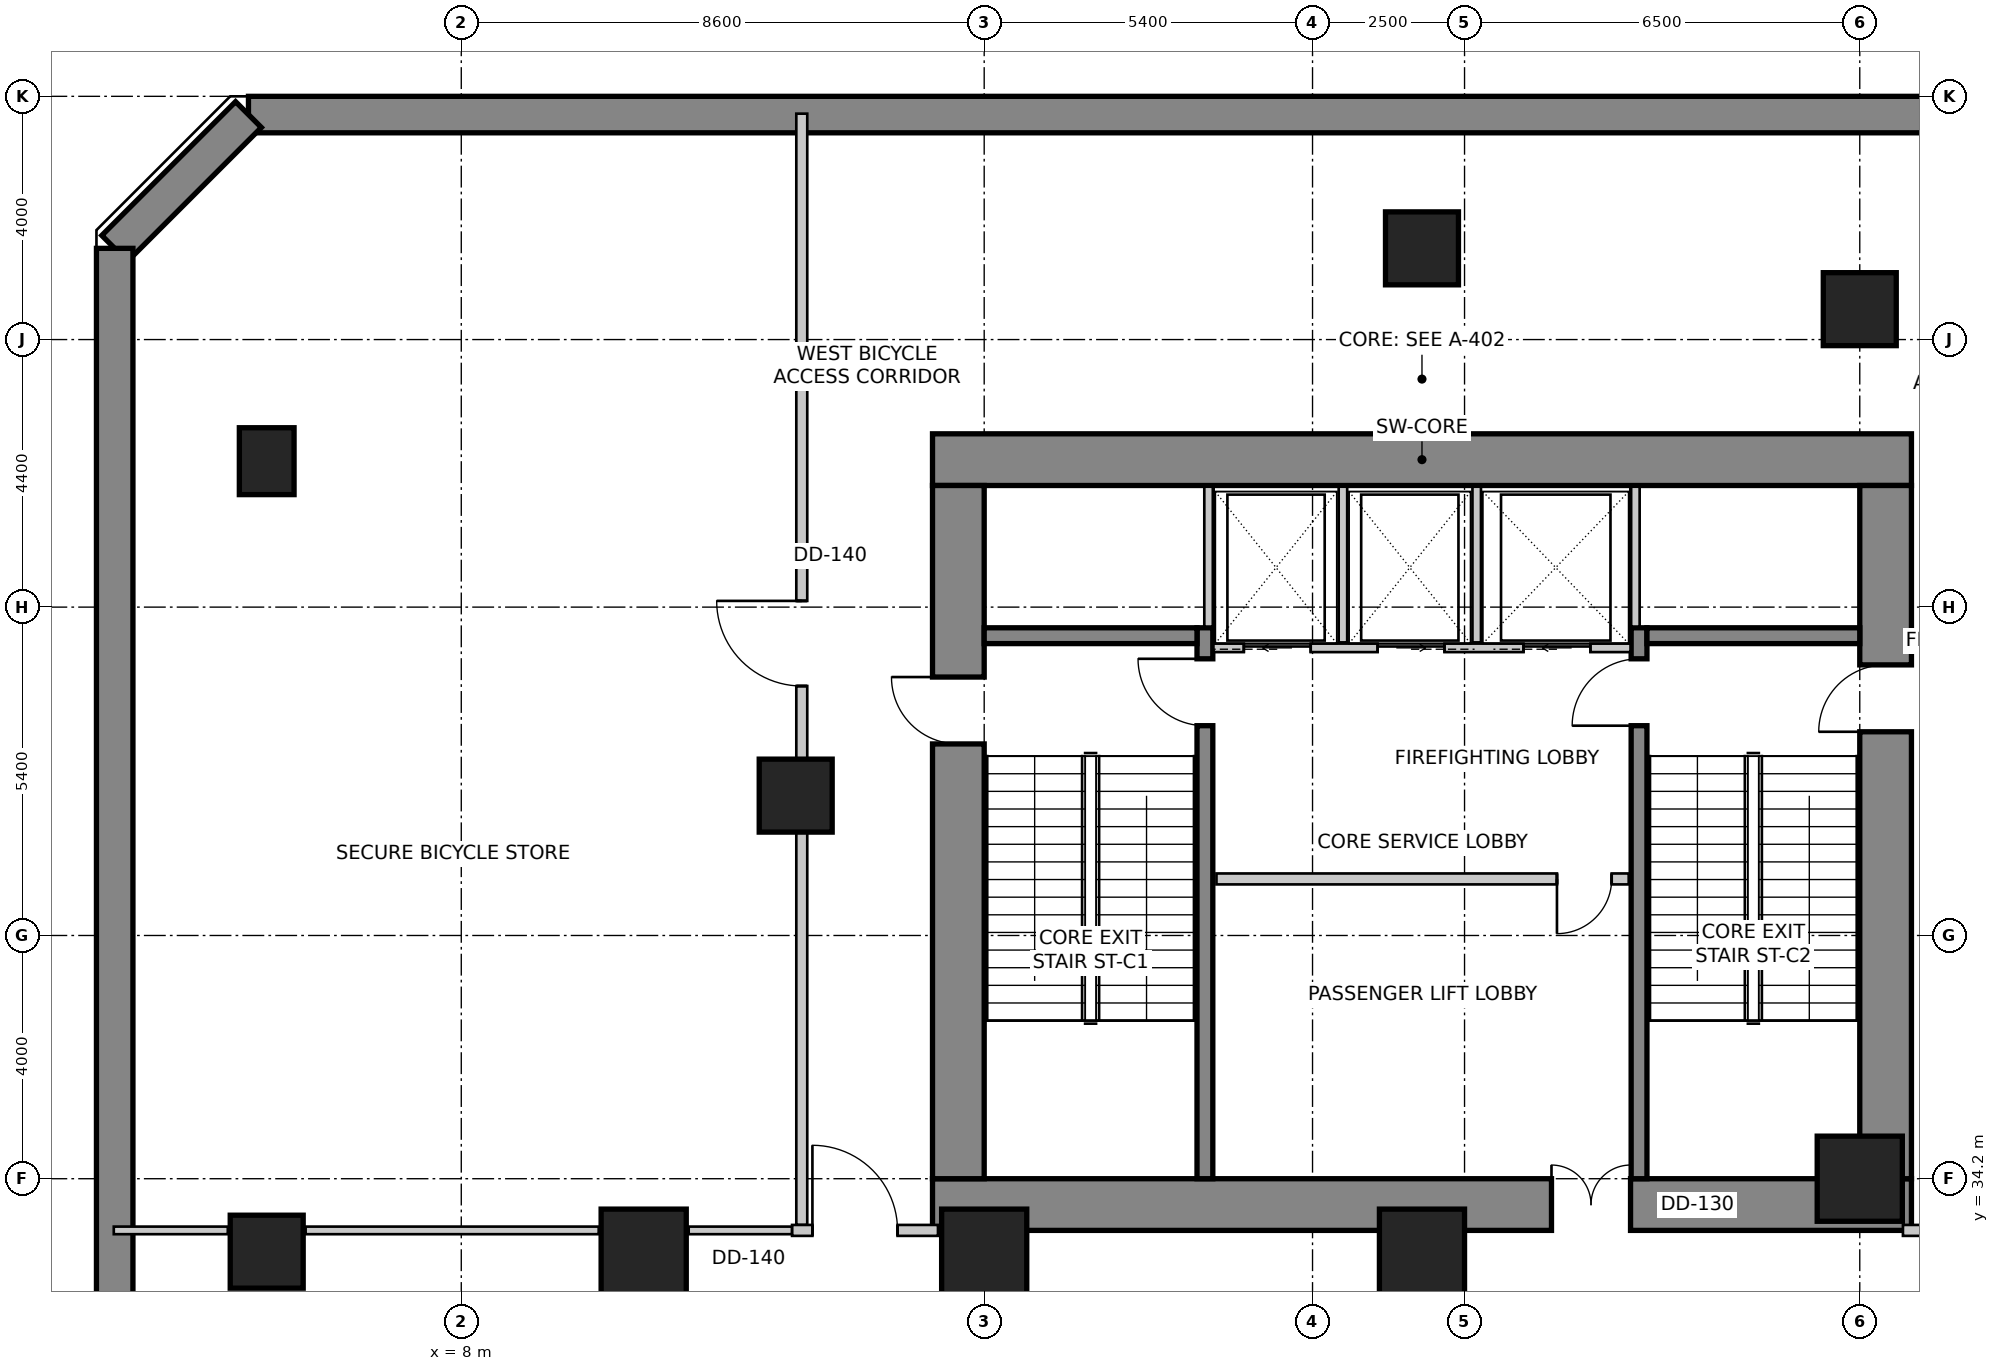
"""IFC4 building model, lengths in metres.
Left out: names, types, materials, properties, quantities, classifications, styles, units other than length and angle.
Written with IfcOpenShell. Run it as: python <this file> out.ifc"""

import sys

from ifc_helpers import new_model, si_unit, direction, frame, frame_2d, origin, origin_2d, place, context, subcontext, project, spatial, rectangle, extrude, source, transform, mapped, element, fill, save


model = new_model("IFC4")
c1 = context("Model", 3, precision=1e-05, world=origin(), true_north=direction((0.0, 1.0)))
c2 = subcontext(c1, "Body", "Model", "MODEL_VIEW")
j1 = project(units=[si_unit("LENGTHUNIT", "METRE"), si_unit("PLANEANGLEUNIT", "RADIAN")], contexts=[c1])
p1 = place(None, origin())
s1 = spatial("IfcSite", under=j1, at=p1, CompositionType="ELEMENT")
p2 = place(p1, origin())
s2 = spatial("IfcBuilding", under=s1, at=p2, CompositionType="ELEMENT")
p3 = place(p2, frame((0.0, 0.0, -5.4)))
s3 = spatial("IfcBuildingStorey", under=s2, at=p3, CompositionType="ELEMENT", Elevation=-5.4)
p4 = place(p3, frame((15.75, 46.025, 0.0), z_axis=(0.0, 0.0, 1.0), x_axis=(1.0, 0.0, 0.0)))
e1 = element("IfcWall", 1, at=p4, inside=s3, PredefinedType="SHEAR", context=c2, shape_type="SweptSolid", body=[
    extrude(rectangle(XDim=16.1, YDim=0.85, at=frame_2d((8.05, 0.0))), origin(), (0.0, 0.0, 1.0), 5.4),
])
p5 = place(p3, frame((15.75, 33.775, 0.0), z_axis=(0.0, 0.0, 1.0), x_axis=(1.0, 0.0, 0.0)))
e2 = element("IfcWall", 2, at=p5, inside=s3, PredefinedType="SHEAR", context=c2, shape_type="SweptSolid", body=[
    extrude(rectangle(XDim=16.1, YDim=0.85, at=frame_2d((8.05, 0.0))), origin(), (0.0, 0.0, 1.0), 5.4),
])
m1 = source(origin(), c2, "Body", "SweptSolid", [
    extrude(rectangle(XDim=1.3, YDim=2.15, at=frame_2d((0.65, 1.075))), frame((0.0, 0.435, 0.0), z_axis=(0.0, -1.0, 0.0), x_axis=(1.0, 0.0, 0.0)), (0.0, 0.0, 1.0), 0.87),
])
p6 = place(p5, frame((10.18, 0.0, 0.0)))
e3 = element("IfcOpeningElement", 3, at=p6, cuts=e2, PredefinedType="OPENING", context=c2, shape_type="MappedRepresentation", body=[
    mapped(m1, transform((0.0, 0.0, 0.0), scale=1.0)),
])
p7 = place(p3, frame((16.175, 34.2, 0.0), z_axis=(0.0, 0.0, 1.0), x_axis=(0.0, 1.0, 0.0)))
e4 = element("IfcWall", 4, at=p7, inside=s3, PredefinedType="SHEAR", context=c2, shape_type="SweptSolid", body=[
    extrude(rectangle(XDim=11.4, YDim=0.85, at=frame_2d((5.7, 0.0))), origin(), (0.0, 0.0, 1.0), 5.4),
])
m2 = source(origin(), c2, "Body", "SweptSolid", [
    extrude(rectangle(XDim=1.1, YDim=2.15, at=frame_2d((0.55, 1.075))), frame((0.0, 0.435, 0.0), z_axis=(0.0, -1.0, 0.0), x_axis=(1.0, 0.0, 0.0)), (0.0, 0.0, 1.0), 0.87),
])
p8 = place(p7, frame((7.15, 0.0, 0.0)))
e5 = element("IfcOpeningElement", 5, at=p8, cuts=e4, PredefinedType="OPENING", context=c2, shape_type="MappedRepresentation", body=[
    mapped(m2, transform((0.0, 0.0, 0.0), scale=1.0)),
])
p9 = place(p3, frame((31.425, 34.2, 0.0), z_axis=(0.0, 0.0, 1.0), x_axis=(0.0, 1.0, 0.0)))
e6 = element("IfcWall", 6, at=p9, inside=s3, PredefinedType="SHEAR", context=c2, shape_type="SweptSolid", body=[
    extrude(rectangle(XDim=11.4, YDim=0.85, at=frame_2d((5.7, 0.0))), origin(), (0.0, 0.0, 1.0), 5.4),
])
p10 = place(p9, frame((7.35, 0.0, 0.0)))
e7 = element("IfcOpeningElement", 7, at=p10, cuts=e6, PredefinedType="OPENING", context=c2, shape_type="MappedRepresentation", body=[
    mapped(m2, transform((0.0, 0.0, 0.0), scale=1.0)),
])
p11 = place(p3, frame((20.23, 34.2, 0.0), z_axis=(0.0, 0.0, 1.0), x_axis=(0.0, 1.0, 0.0)))
e8 = element("IfcWall", 8, at=p11, inside=s3, PredefinedType="SHEAR", context=c2, shape_type="SweptSolid", body=[
    extrude(rectangle(XDim=9.06, YDim=0.26, at=frame_2d((4.53, 0.0))), origin(), (0.0, 0.0, 1.0), 5.4),
])
m3 = source(origin(), c2, "Body", "SweptSolid", [
    extrude(rectangle(XDim=1.1, YDim=2.15, at=frame_2d((0.55, 1.075))), frame((0.0, 0.14, 0.0), z_axis=(0.0, -1.0, 0.0), x_axis=(1.0, 0.0, 0.0)), (0.0, 0.0, 1.0), 0.28),
])
p12 = place(p11, frame((7.45, 0.0, 0.0)))
e9 = element("IfcOpeningElement", 9, at=p12, cuts=e8, PredefinedType="OPENING", context=c2, shape_type="MappedRepresentation", body=[
    mapped(m3, transform((0.0, 0.0, 0.0), scale=1.0)),
])
p13 = place(p3, frame((27.37, 34.2, 0.0), z_axis=(0.0, 0.0, 1.0), x_axis=(0.0, 1.0, 0.0)))
e10 = element("IfcWall", 10, at=p13, inside=s3, PredefinedType="SHEAR", context=c2, shape_type="SweptSolid", body=[
    extrude(rectangle(XDim=9.06, YDim=0.26, at=frame_2d((4.53, 0.0))), origin(), (0.0, 0.0, 1.0), 5.4),
])
p14 = place(p13, frame((7.45, 0.0, 0.0)))
e11 = element("IfcOpeningElement", 11, at=p14, cuts=e10, PredefinedType="OPENING", context=c2, shape_type="MappedRepresentation", body=[
    mapped(m3, transform((0.0, 0.0, 0.0), scale=1.0)),
])
for number, where, z_axis, x_axis in (
    (12, (16.6, 43.13, 0.0), (0.0, 0.0, 1.0), (1.0, 0.0, 0.0)),
    (13, (27.5, 43.13, 0.0), (0.0, 0.0, 1.0), (1.0, 0.0, 0.0)),
):
    element("IfcWall", number, at=place(p3, frame(where, z_axis=z_axis, x_axis=x_axis)), inside=s3, PredefinedType="SHEAR", context=c2, shape_type="SweptSolid", body=[
        extrude(rectangle(XDim=3.5, YDim=0.26, at=frame_2d((1.75, 0.0))), origin(), (0.0, 0.0, 1.0), 5.4),
    ])
p15 = place(p3, frame((65.5, 51.7, 0.0), z_axis=(0.0, 0.0, 1.0), x_axis=(-1.0, 0.0, 0.0)))
e14 = element("IfcWall", 14, at=p15, inside=s3, PredefinedType="SHEAR", context=c2, shape_type="SweptSolid", body=[
    extrude(rectangle(XDim=61.0, YDim=0.6, at=frame_2d((30.5, 0.0))), origin(), (0.0, 0.0, 1.0), 5.4),
])
p16 = place(p3, frame((4.5, 51.7, 0.0), z_axis=(0.0, 0.0, 1.0), x_axis=(-0.707106781187, -0.707106781187, 0.0)))
e15 = element("IfcWall", 15, at=p16, inside=s3, PredefinedType="SHEAR", context=c2, shape_type="SweptSolid", body=[
    extrude(rectangle(XDim=3.111, YDim=0.6, at=frame_2d((1.556, 0.0))), origin(), (0.0, 0.0, 1.0), 5.4),
])
p17 = place(p3, frame((2.3, 49.5, 0.0), z_axis=(0.0, 0.0, 1.0), x_axis=(0.0, -1.0, 0.0)))
e16 = element("IfcWall", 16, at=p17, inside=s3, PredefinedType="SHEAR", context=c2, shape_type="SweptSolid", body=[
    extrude(rectangle(XDim=45.0, YDim=0.6, at=frame_2d((22.5, 0.0))), origin(), (0.0, 0.0, 1.0), 5.4),
])
m4 = source(origin(), c2, "Body", "SweptSolid", [
    extrude(rectangle(XDim=1.2, YDim=1.2, at=origin_2d()), origin(), (0.0, 0.0, 1.0), 5.4),
])
p18 = place(p3, frame((4.8, 33.0, 0.0), z_axis=(0.0, 0.0, 1.0), x_axis=(1.0, 0.0, 0.0)))
e17 = element("IfcColumn", 17, at=p18, inside=s3, PredefinedType="COLUMN", context=c2, shape_type="MappedRepresentation", body=[
    mapped(m4, transform((0.0, 0.0, 0.0), scale=1.0)),
])
m5 = source(origin(), c2, "Body", "SweptSolid", [
    extrude(rectangle(XDim=1.4, YDim=1.4, at=origin_2d()), origin(), (0.0, 0.0, 1.0), 5.4),
])
for number, where, z_axis, x_axis in (
    (18, (11.0, 33.0, 0.0), (0.0, 0.0, 1.0), (1.0, 0.0, 0.0)),
    (19, (16.6, 33.0, 0.0), (0.0, 0.0, 1.0), (1.0, 0.0, 0.0)),
    (20, (23.8, 33.0, 0.0), (0.0, 0.0, 1.0), (1.0, 0.0, 0.0)),
    (21, (31.0, 34.2, 0.0), (0.0, 0.0, 1.0), (1.0, 0.0, 0.0)),
):
    element("IfcColumn", number, at=place(p3, frame(where, z_axis=z_axis, x_axis=x_axis)), inside=s3, PredefinedType="COLUMN", context=c2, shape_type="MappedRepresentation", body=[
        mapped(m5, transform((0.0, 0.0, 0.0), scale=1.0)),
    ])
m6 = source(origin(), c2, "Body", "SweptSolid", [
    extrude(rectangle(XDim=0.9, YDim=1.1, at=origin_2d()), origin(), (0.0, 0.0, 1.0), 5.4),
])
p19 = place(p3, frame((4.8, 46.0, 0.0), z_axis=(0.0, 0.0, 1.0), x_axis=(1.0, 0.0, 0.0)))
e22 = element("IfcColumn", 22, at=p19, inside=s3, PredefinedType="COLUMN", context=c2, shape_type="MappedRepresentation", body=[
    mapped(m6, transform((0.0, 0.0, 0.0), scale=1.0)),
])
for number, where, z_axis, x_axis in (
    (23, (13.5, 40.5, 0.0), (0.0, 0.0, 1.0), (1.0, 0.0, 0.0)),
    (24, (23.8, 49.5, 0.0), (0.0, 0.0, 1.0), (1.0, 0.0, 0.0)),
    (25, (31.0, 48.5, 0.0), (0.0, 0.0, 1.0), (1.0, 0.0, 0.0)),
):
    element("IfcColumn", number, at=place(p3, frame(where, z_axis=z_axis, x_axis=x_axis)), inside=s3, PredefinedType="COLUMN", context=c2, shape_type="MappedRepresentation", body=[
        mapped(m4, transform((0.0, 0.0, 0.0), scale=1.0)),
    ])
p20 = place(p3, frame((20.37, 42.93, 0.0), z_axis=(0.0, 0.0, 1.0), x_axis=(1.0, 0.0, 0.0)))
e26 = element("IfcWall", 26, at=p20, inside=s3, PredefinedType="SOLIDWALL", context=c2, shape_type="SweptSolid", body=[
    extrude(rectangle(XDim=6.86, YDim=0.14, at=frame_2d((3.43, 0.0))), origin(), (0.0, 0.0, 1.0), 5.1),
])
m7 = source(origin(), c2, "Body", "SweptSolid", [
    extrude(rectangle(XDim=1.1, YDim=2.15, at=frame_2d((0.55, 1.075))), frame((0.0, 0.08, 0.0), z_axis=(0.0, -1.0, 0.0), x_axis=(1.0, 0.0, 0.0)), (0.0, 0.0, 1.0), 0.16),
])
p21 = place(p20, frame((0.5, 0.0, 0.0)))
e27 = element("IfcOpeningElement", 27, at=p21, cuts=e26, PredefinedType="OPENING", context=c2, shape_type="MappedRepresentation", body=[
    mapped(m7, transform((0.0, 0.0, 0.0), scale=1.0)),
])
p22 = place(p20, frame((2.7, 0.0, 0.0)))
e28 = element("IfcOpeningElement", 28, at=p22, cuts=e26, PredefinedType="OPENING", context=c2, shape_type="MappedRepresentation", body=[
    mapped(m7, transform((0.0, 0.0, 0.0), scale=1.0)),
])
p23 = place(p20, frame((5.1, 0.0, 0.0)))
e29 = element("IfcOpeningElement", 29, at=p23, cuts=e26, PredefinedType="OPENING", context=c2, shape_type="MappedRepresentation", body=[
    mapped(m7, transform((0.0, 0.0, 0.0), scale=1.0)),
])
for number, where, z_axis, x_axis in (
    (30, (20.29, 43.28, 0.0), (0.0, 0.0, 1.0), (0.0, 1.0, 0.0)),
    (31, (27.31, 43.28, 0.0), (0.0, 0.0, 1.0), (0.0, 1.0, 0.0)),
):
    element("IfcWall", number, at=place(p3, frame(where, z_axis=z_axis, x_axis=x_axis)), inside=s3, PredefinedType="SOLIDWALL", context=c2, shape_type="SweptSolid", body=[
        extrude(rectangle(XDim=2.3, YDim=0.14, at=frame_2d((1.15, 0.0))), origin(), (0.0, 0.0, 1.0), 5.1),
    ])
for number, where, z_axis, x_axis in (
    (32, (22.5, 43.02, 0.0), (0.0, 0.0, 1.0), (0.0, 1.0, 0.0)),
    (33, (24.7, 43.02, 0.0), (0.0, 0.0, 1.0), (0.0, 1.0, 0.0)),
):
    element("IfcWall", number, at=place(p3, frame(where, z_axis=z_axis, x_axis=x_axis)), inside=s3, PredefinedType="SOLIDWALL", context=c2, shape_type="SweptSolid", body=[
        extrude(rectangle(XDim=2.56, YDim=0.14, at=frame_2d((1.28, 0.0))), origin(), (0.0, 0.0, 1.0), 5.1),
    ])
p24 = place(p3, frame((27.2, 39.13, 0.0), z_axis=(0.0, 0.0, 1.0), x_axis=(-1.0, 0.0, 0.0)))
e34 = element("IfcWall", 34, at=p24, inside=s3, PredefinedType="PARTITIONING", context=c2, shape_type="SweptSolid", body=[
    extrude(rectangle(XDim=6.78, YDim=0.18, at=frame_2d((3.39, 0.0))), origin(), (0.0, 0.0, 1.0), 5.1),
])
m8 = source(origin(), c2, "Body", "SweptSolid", [
    extrude(rectangle(XDim=0.9, YDim=2.15, at=frame_2d((0.45, 1.075))), frame((0.0, 0.1, 0.0), z_axis=(0.0, -1.0, 0.0), x_axis=(1.0, 0.0, 0.0)), (0.0, 0.0, 1.0), 0.2),
])
p25 = place(p24, frame((0.28, 0.0, 0.0)))
e35 = element("IfcOpeningElement", 35, at=p25, cuts=e34, PredefinedType="OPENING", context=c2, shape_type="MappedRepresentation", body=[
    mapped(m8, transform((0.0, 0.0, 0.0), scale=1.0)),
])
p26 = place(p3, frame((13.44, 33.35, 0.0), z_axis=(0.0, 0.0, 1.0), x_axis=(1.0, 0.0, 0.0)))
e36 = element("IfcWall", 36, at=p26, inside=s3, PredefinedType="PARTITIONING", context=c2, shape_type="SweptSolid", body=[
    extrude(rectangle(XDim=2.4, YDim=0.18, at=frame_2d((1.2, 0.0))), origin(), (0.0, 0.0, 1.0), 3.892),
])
m9 = source(origin(), c2, "Body", "SweptSolid", [
    extrude(rectangle(XDim=1.4, YDim=2.15, at=frame_2d((0.7, 1.075))), frame((0.0, 0.1, 0.0), z_axis=(0.0, -1.0, 0.0), x_axis=(1.0, 0.0, 0.0)), (0.0, 0.0, 1.0), 0.2),
])
p27 = place(p26, frame((0.335, 0.0, 0.0)))
e37 = element("IfcOpeningElement", 37, at=p27, cuts=e36, PredefinedType="OPENING", context=c2, shape_type="MappedRepresentation", body=[
    mapped(m9, transform((0.0, 0.0, 0.0), scale=1.0)),
])
p28 = place(p3, frame((5.44, 33.35, 0.0), z_axis=(0.0, 0.0, 1.0), x_axis=(1.0, 0.0, 0.0)))
e38 = element("IfcWall", 38, at=p28, inside=s3, PredefinedType="PARTITIONING", context=c2, shape_type="SweptSolid", body=[
    extrude(rectangle(XDim=4.82, YDim=0.125, at=frame_2d((2.41, 0.0))), origin(), (0.0, 0.0, 1.0), 3.892),
])
p29 = place(p3, frame((11.74, 33.35, 0.0), z_axis=(0.0, 0.0, 1.0), x_axis=(1.0, 0.0, 0.0)))
e39 = element("IfcWall", 39, at=p29, inside=s3, PredefinedType="PARTITIONING", context=c2, shape_type="SweptSolid", body=[
    extrude(rectangle(XDim=1.698, YDim=0.125, at=frame_2d((0.849, 0.0))), origin(), (0.0, 0.0, 1.0), 3.892),
])
p30 = place(p3, frame((2.285, 33.35, 0.0), z_axis=(0.0, 0.0, 1.0), x_axis=(1.0, 0.0, 0.0)))
e40 = element("IfcWall", 40, at=p30, inside=s3, PredefinedType="PARTITIONING", context=c2, shape_type="SweptSolid", body=[
    extrude(rectangle(XDim=1.875, YDim=0.125, at=frame_2d((0.938, 0.0))), origin(), (0.0, 0.0, 1.0), 5.1),
])
p31 = place(p3, frame((31.71, 33.35, 0.0), z_axis=(0.0, 0.0, 1.0), x_axis=(1.0, 0.0, 0.0)))
e41 = element("IfcWall", 41, at=p31, inside=s3, PredefinedType="PARTITIONING", context=c2, shape_type="SweptSolid", body=[
    extrude(rectangle(XDim=3.45, YDim=0.18, at=frame_2d((1.725, 0.0))), origin(), (0.0, 0.0, 1.0), 5.1),
])
m10 = source(origin(), c2, "Body", "SweptSolid", [
    extrude(rectangle(XDim=1.1, YDim=2.15, at=frame_2d((0.55, 1.075))), frame((0.0, 0.1, 0.0), z_axis=(0.0, -1.0, 0.0), x_axis=(1.0, 0.0, 0.0)), (0.0, 0.0, 1.0), 0.2),
])
p32 = place(p31, frame((1.175, 0.0, 0.0)))
e42 = element("IfcOpeningElement", 42, at=p32, cuts=e41, PredefinedType="OPENING", context=c2, shape_type="MappedRepresentation", body=[
    mapped(m10, transform((0.0, 0.0, 0.0), scale=1.0)),
])
p33 = place(p3, frame((13.6, 33.444, 0.0), z_axis=(0.0, 0.0, 1.0), x_axis=(0.0, 1.0, 0.0)))
e43 = element("IfcWall", 43, at=p33, inside=s3, PredefinedType="PARTITIONING", context=c2, shape_type="SweptSolid", body=[
    extrude(rectangle(XDim=18.271, YDim=0.18, at=frame_2d((9.135, 0.0))), origin(), (0.0, 0.0, 1.0), 4.142),
])
p34 = place(p33, frame((8.858, 0.0, 0.0)))
e44 = element("IfcOpeningElement", 44, at=p34, cuts=e43, PredefinedType="OPENING", context=c2, shape_type="MappedRepresentation", body=[
    mapped(m9, transform((0.0, 0.0, 0.0), scale=1.0)),
])
m11 = source(origin(), c2, "Body", "SweptSolid", [
    extrude(rectangle(XDim=1.1, YDim=2.15, at=frame_2d((0.55, 1.075))), frame((0.0, 0.025, 0.0), z_axis=(0.0, -1.0, 0.0), x_axis=(1.0, 0.0, 0.0)), (0.0, 0.0, 1.0), 0.05),
])
p35 = place(p21, origin())
e45 = element("IfcDoor", 45, at=p35, inside=s3, OperationType="SLIDING_TO_LEFT", PredefinedType="DOOR", context=c2, shape_type="MappedRepresentation", body=[
    mapped(m11, transform((0.0, 0.0, 0.0), scale=1.0)),
])
fill(e27, e45)
p36 = place(p22, origin())
e46 = element("IfcDoor", 46, at=p36, inside=s3, OperationType="SLIDING_TO_RIGHT", PredefinedType="DOOR", context=c2, shape_type="MappedRepresentation", body=[
    mapped(m11, transform((0.0, 0.0, 0.0), scale=1.0)),
])
fill(e28, e46)
m12 = source(origin(), c2, "Body", "SweptSolid", [
    extrude(rectangle(XDim=1.1, YDim=2.15, at=frame_2d((0.55, 1.075))), frame((0.0, 0.025, 0.0), z_axis=(0.0, -1.0, 0.0), x_axis=(1.0, 0.0, 0.0)), (0.0, 0.0, 1.0), 0.05),
])
p37 = place(p23, origin())
e47 = element("IfcDoor", 47, at=p37, inside=s3, OperationType="SLIDING_TO_LEFT", PredefinedType="DOOR", context=c2, shape_type="MappedRepresentation", body=[
    mapped(m12, transform((0.0, 0.0, 0.0), scale=1.0)),
])
fill(e29, e47)
m13 = source(origin(), c2, "Body", "SweptSolid", [
    extrude(rectangle(XDim=1.1, YDim=2.15, at=frame_2d((0.55, 1.075))), frame((0.0, 0.025, 0.0), z_axis=(0.0, -1.0, 0.0), x_axis=(1.0, 0.0, 0.0)), (0.0, 0.0, 1.0), 0.05),
])
p38 = place(p12, origin())
e48 = element("IfcDoor", 48, at=p38, inside=s3, OperationType="SINGLE_SWING_RIGHT", PredefinedType="DOOR", context=c2, shape_type="MappedRepresentation", body=[
    mapped(m13, transform((0.0, 0.0, 0.0), scale=1.0)),
])
fill(e9, e48)
p39 = place(p14, origin())
e49 = element("IfcDoor", 49, at=p39, inside=s3, OperationType="SINGLE_SWING_LEFT", PredefinedType="DOOR", context=c2, shape_type="MappedRepresentation", body=[
    mapped(m13, transform((0.0, 0.0, 0.0), scale=1.0)),
])
fill(e11, e49)
p40 = place(p8, origin())
e50 = element("IfcDoor", 50, at=p40, inside=s3, OperationType="SINGLE_SWING_RIGHT", PredefinedType="DOOR", context=c2, shape_type="MappedRepresentation", body=[
    mapped(m13, transform((0.0, 0.0, 0.0), scale=1.0)),
])
fill(e5, e50)
p41 = place(p10, origin())
e51 = element("IfcDoor", 51, at=p41, inside=s3, OperationType="SINGLE_SWING_LEFT", PredefinedType="DOOR", context=c2, shape_type="MappedRepresentation", body=[
    mapped(m13, transform((0.0, 0.0, 0.0), scale=1.0)),
])
fill(e7, e51)
m14 = source(origin(), c2, "Body", "SweptSolid", [
    extrude(rectangle(XDim=1.3, YDim=2.15, at=frame_2d((0.65, 1.075))), frame((0.0, 0.025, 0.0), z_axis=(0.0, -1.0, 0.0), x_axis=(1.0, 0.0, 0.0)), (0.0, 0.0, 1.0), 0.05),
])
p42 = place(p6, origin())
e52 = element("IfcDoor", 52, at=p42, inside=s3, OperationType="DOUBLE_DOOR_SINGLE_SWING", PredefinedType="DOOR", context=c2, shape_type="MappedRepresentation", body=[
    mapped(m14, transform((0.0, 0.0, 0.0), scale=1.0)),
])
fill(e3, e52)
m15 = source(origin(), c2, "Body", "SweptSolid", [
    extrude(rectangle(XDim=0.9, YDim=2.15, at=frame_2d((0.45, 1.075))), frame((0.0, 0.025, 0.0), z_axis=(0.0, -1.0, 0.0), x_axis=(1.0, 0.0, 0.0)), (0.0, 0.0, 1.0), 0.05),
])
p43 = place(p25, origin())
e53 = element("IfcDoor", 53, at=p43, inside=s3, OperationType="SINGLE_SWING_RIGHT", PredefinedType="DOOR", context=c2, shape_type="MappedRepresentation", body=[
    mapped(m15, transform((0.0, 0.0, 0.0), scale=1.0)),
])
fill(e35, e53)
m16 = source(origin(), c2, "Body", "SweptSolid", [
    extrude(rectangle(XDim=1.4, YDim=2.15, at=frame_2d((0.7, 1.075))), frame((0.0, 0.025, 0.0), z_axis=(0.0, -1.0, 0.0), x_axis=(1.0, 0.0, 0.0)), (0.0, 0.0, 1.0), 0.05),
])
p44 = place(p27, origin())
e54 = element("IfcDoor", 54, at=p44, inside=s3, OperationType="SINGLE_SWING_LEFT", PredefinedType="DOOR", context=c2, shape_type="MappedRepresentation", body=[
    mapped(m16, transform((0.0, 0.0, 0.0), scale=1.0)),
])
fill(e37, e54)
p45 = place(p34, origin())
e55 = element("IfcDoor", 55, at=p45, inside=s3, OperationType="SINGLE_SWING_RIGHT", PredefinedType="DOOR", context=c2, shape_type="MappedRepresentation", body=[
    mapped(m16, transform((0.0, 0.0, 0.0), scale=1.0)),
])
fill(e44, e55)
save(model, sys.argv[1])
